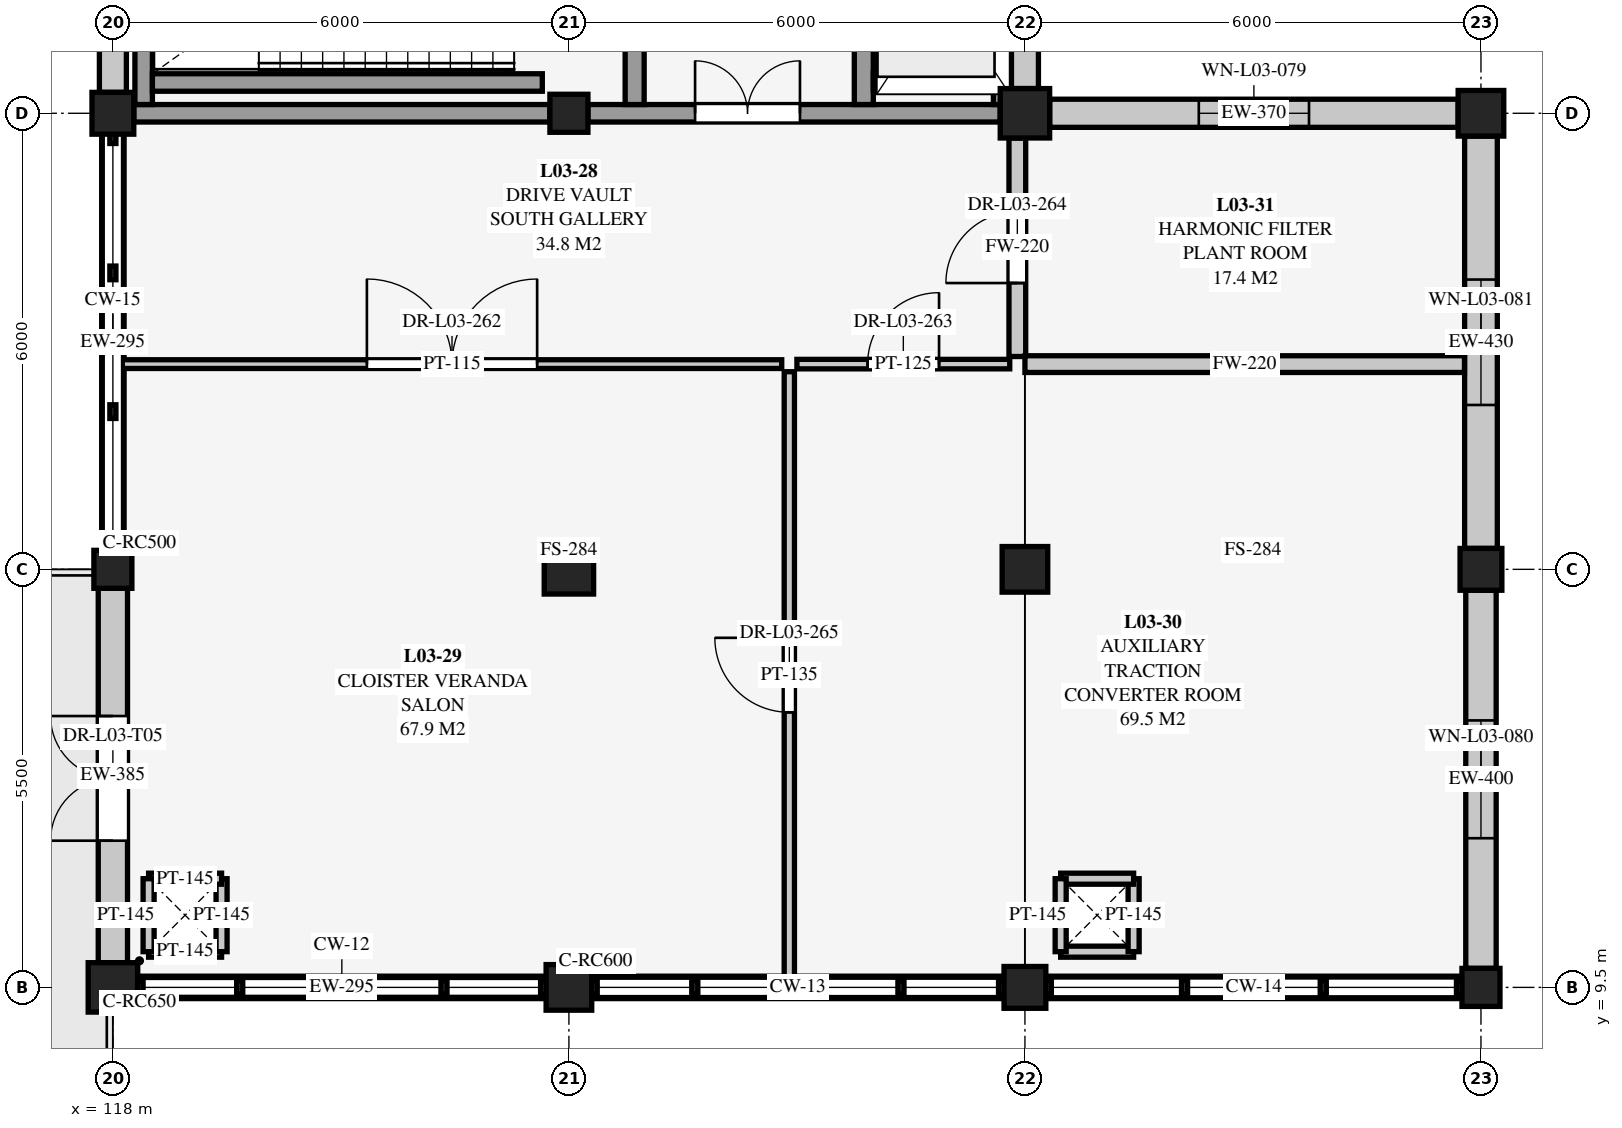
"""IFC4 building model, lengths in metres.
Left out: names, types, materials, properties, quantities, classifications, styles, units other than length and angle.
Written with IfcOpenShell. Run it as: python <this file> out.ifc"""

import sys

from ifc_helpers import new_model, si_unit, direction, frame, frame_2d, origin, origin_2d, place, context, subcontext, project, spatial, rectangle, extrude, element, fill, save


model = new_model("IFC4")
c1 = context("Model", 3, precision=1e-05, world=origin(), true_north=direction((0.0, 1.0)))
c2 = subcontext(c1, "Body", "Model", "MODEL_VIEW")
j1 = project(units=[si_unit("LENGTHUNIT", "METRE"), si_unit("PLANEANGLEUNIT", "RADIAN")], contexts=[c1])
p1 = place(None, origin())
s1 = spatial("IfcSite", under=j1, at=p1, CompositionType="ELEMENT")
p2 = place(p1, origin())
s2 = spatial("IfcBuilding", under=s1, at=p2, CompositionType="ELEMENT")
p3 = place(p2, frame((0.0, 0.0, 9.0)))
s3 = spatial("IfcBuildingStorey", under=s2, at=p3, CompositionType="ELEMENT", Elevation=9.0)
p4 = place(p3, frame((118.0, 9.5, 0.0), z_axis=(0.0, 0.0, 1.0), x_axis=(1.0, 0.0, 0.0)))
e1 = element("IfcColumn", 1, at=p4, inside=s3, PredefinedType="COLUMN", context=c2, shape_type="SweptSolid", body=[
    extrude(rectangle(XDim=0.65, YDim=0.65, at=origin_2d()), origin(), (0.0, 0.0, 1.0), 4.5),
])
p5 = place(p3, frame((118.0, 15.0, 0.0), z_axis=(0.0, 0.0, 1.0), x_axis=(1.0, 0.0, 0.0)))
e2 = element("IfcColumn", 2, at=p5, inside=s3, PredefinedType="COLUMN", context=c2, shape_type="SweptSolid", body=[
    extrude(rectangle(XDim=0.5, YDim=0.5, at=origin_2d()), origin(), (0.0, 0.0, 1.0), 4.5),
])
p6 = place(p3, frame((118.0, 21.0, 0.0), z_axis=(0.0, 0.0, 1.0), x_axis=(1.0, 0.0, 0.0)))
e3 = element("IfcColumn", 3, at=p6, inside=s3, PredefinedType="COLUMN", context=c2, shape_type="SweptSolid", body=[
    extrude(rectangle(XDim=0.55, YDim=0.55, at=origin_2d()), origin(), (0.0, 0.0, 1.0), 4.5),
])
p7 = place(p3, frame((124.0, 9.5, 0.0), z_axis=(0.0, 0.0, 1.0), x_axis=(1.0, 0.0, 0.0)))
e4 = element("IfcColumn", 4, at=p7, inside=s3, PredefinedType="COLUMN", context=c2, shape_type="SweptSolid", body=[
    extrude(rectangle(XDim=0.6, YDim=0.6, at=origin_2d()), origin(), (0.0, 0.0, 1.0), 4.5),
])
p8 = place(p3, frame((124.0, 15.0, 0.0), z_axis=(0.0, 0.0, 1.0), x_axis=(1.0, 0.0, 0.0)))
e5 = element("IfcColumn", 5, at=p8, inside=s3, PredefinedType="COLUMN", context=c2, shape_type="SweptSolid", body=[
    extrude(rectangle(XDim=0.65, YDim=0.65, at=origin_2d()), origin(), (0.0, 0.0, 1.0), 4.5),
])
p9 = place(p3, frame((124.0, 21.0, 0.0), z_axis=(0.0, 0.0, 1.0), x_axis=(1.0, 0.0, 0.0)))
e6 = element("IfcColumn", 6, at=p9, inside=s3, PredefinedType="COLUMN", context=c2, shape_type="SweptSolid", body=[
    extrude(rectangle(XDim=0.5, YDim=0.5, at=origin_2d()), origin(), (0.0, 0.0, 1.0), 4.5),
])
p10 = place(p3, frame((130.0, 9.5, 0.0), z_axis=(0.0, 0.0, 1.0), x_axis=(1.0, 0.0, 0.0)))
e7 = element("IfcColumn", 7, at=p10, inside=s3, PredefinedType="COLUMN", context=c2, shape_type="SweptSolid", body=[
    extrude(rectangle(XDim=0.55, YDim=0.55, at=origin_2d()), origin(), (0.0, 0.0, 1.0), 4.5),
])
p11 = place(p3, frame((130.0, 15.0, 0.0), z_axis=(0.0, 0.0, 1.0), x_axis=(1.0, 0.0, 0.0)))
e8 = element("IfcColumn", 8, at=p11, inside=s3, PredefinedType="COLUMN", context=c2, shape_type="SweptSolid", body=[
    extrude(rectangle(XDim=0.6, YDim=0.6, at=origin_2d()), origin(), (0.0, 0.0, 1.0), 4.5),
])
p12 = place(p3, frame((130.0, 21.0, 0.0), z_axis=(0.0, 0.0, 1.0), x_axis=(1.0, 0.0, 0.0)))
e9 = element("IfcColumn", 9, at=p12, inside=s3, PredefinedType="COLUMN", context=c2, shape_type="SweptSolid", body=[
    extrude(rectangle(XDim=0.65, YDim=0.65, at=origin_2d()), origin(), (0.0, 0.0, 1.0), 4.5),
])
p13 = place(p3, frame((136.0, 9.5, 0.0), z_axis=(0.0, 0.0, 1.0), x_axis=(1.0, 0.0, 0.0)))
e10 = element("IfcColumn", 10, at=p13, inside=s3, PredefinedType="COLUMN", context=c2, shape_type="SweptSolid", body=[
    extrude(rectangle(XDim=0.5, YDim=0.5, at=origin_2d()), origin(), (0.0, 0.0, 1.0), 4.5),
])
p14 = place(p3, frame((136.0, 15.0, 0.0), z_axis=(0.0, 0.0, 1.0), x_axis=(1.0, 0.0, 0.0)))
e11 = element("IfcColumn", 11, at=p14, inside=s3, PredefinedType="COLUMN", context=c2, shape_type="SweptSolid", body=[
    extrude(rectangle(XDim=0.55, YDim=0.55, at=origin_2d()), origin(), (0.0, 0.0, 1.0), 4.5),
])
p15 = place(p3, frame((136.0, 21.0, 0.0), z_axis=(0.0, 0.0, 1.0), x_axis=(1.0, 0.0, 0.0)))
e12 = element("IfcColumn", 12, at=p15, inside=s3, PredefinedType="COLUMN", context=c2, shape_type="SweptSolid", body=[
    extrude(rectangle(XDim=0.6, YDim=0.6, at=origin_2d()), origin(), (0.0, 0.0, 1.0), 4.5),
])
p16 = place(p3, frame((123.7, 9.5, 0.0), z_axis=(0.0, 0.0, 1.0), x_axis=(-1.0, 0.0, 0.0)))
e13 = element("IfcWall", 13, at=p16, inside=s3, PredefinedType="SOLIDWALL", context=c2, shape_type="SweptSolid", body=[
    extrude(rectangle(XDim=5.375, YDim=0.295, at=frame_2d((2.688, 0.0))), origin(), (0.0, 0.0, 1.0), 0.31),
])
p17 = place(p3, frame((129.725, 9.5, 0.0), z_axis=(0.0, 0.0, 1.0), x_axis=(-1.0, 0.0, 0.0)))
e14 = element("IfcWall", 14, at=p17, inside=s3, PredefinedType="SOLIDWALL", context=c2, shape_type="SweptSolid", body=[
    extrude(rectangle(XDim=5.425, YDim=0.295, at=frame_2d((2.712, 0.0))), origin(), (0.0, 0.0, 1.0), 0.36),
])
p18 = place(p3, frame((135.75, 9.5, 0.0), z_axis=(0.0, 0.0, 1.0), x_axis=(-1.0, 0.0, 0.0)))
e15 = element("IfcWall", 15, at=p18, inside=s3, PredefinedType="SOLIDWALL", context=c2, shape_type="SweptSolid", body=[
    extrude(rectangle(XDim=5.475, YDim=0.295, at=frame_2d((2.738, 0.0))), origin(), (0.0, 0.0, 1.0), 0.41),
])
p19 = place(p3, frame((130.325, 21.0, 0.0), z_axis=(0.0, 0.0, 1.0), x_axis=(1.0, 0.0, 0.0)))
e16 = element("IfcWall", 16, at=p19, inside=s3, PredefinedType="SOLIDWALL", context=c2, shape_type="SweptSolid", body=[
    extrude(rectangle(XDim=5.375, YDim=0.37, at=frame_2d((2.688, 0.0))), origin(), (0.0, 0.0, 1.0), 3.778),
])
p20 = place(p19, frame((1.962, 0.0, 0.75)))
e17 = element("IfcOpeningElement", 17, at=p20, cuts=e16, PredefinedType="OPENING", context=c2, shape_type="SweptSolid", body=[
    extrude(rectangle(XDim=1.45, YDim=2.25, at=frame_2d((0.725, 1.125))), frame((0.0, 0.195, 0.0), z_axis=(0.0, -1.0, 0.0), x_axis=(1.0, 0.0, 0.0)), (0.0, 0.0, 1.0), 0.39),
])
p21 = place(p3, frame((118.0, 9.825, 0.0), z_axis=(0.0, 0.0, 1.0), x_axis=(0.0, 1.0, 0.0)))
e18 = element("IfcWall", 18, at=p21, inside=s3, PredefinedType="SOLIDWALL", context=c2, shape_type="SweptSolid", body=[
    extrude(rectangle(XDim=4.925, YDim=0.385, at=frame_2d((2.462, 0.0))), origin(), (0.0, 0.0, 1.0), 4.146),
])
p22 = place(p21, frame((1.605, 0.0, 0.0)))
e19 = element("IfcOpeningElement", 19, at=p22, cuts=e18, PredefinedType="OPENING", context=c2, shape_type="SweptSolid", body=[
    extrude(rectangle(XDim=1.64, YDim=2.22, at=frame_2d((0.82, 1.11))), frame((0.0, 0.202, 0.0), z_axis=(0.0, -1.0, 0.0), x_axis=(1.0, 0.0, 0.0)), (0.0, 0.0, 1.0), 0.405),
])
p23 = place(p3, frame((136.0, 14.725, 0.0), z_axis=(0.0, 0.0, 1.0), x_axis=(0.0, -1.0, 0.0)))
e20 = element("IfcWall", 20, at=p23, inside=s3, PredefinedType="SOLIDWALL", context=c2, shape_type="SweptSolid", body=[
    extrude(rectangle(XDim=4.975, YDim=0.4, at=frame_2d((2.488, 0.0))), origin(), (0.0, 0.0, 1.0), 4.093),
])
p24 = place(p23, frame((1.712, 0.0, 0.75)))
e21 = element("IfcOpeningElement", 21, at=p24, cuts=e20, PredefinedType="OPENING", context=c2, shape_type="SweptSolid", body=[
    extrude(rectangle(XDim=1.55, YDim=2.25, at=frame_2d((0.775, 1.125))), frame((0.0, 0.21, 0.0), z_axis=(0.0, -1.0, 0.0), x_axis=(1.0, 0.0, 0.0)), (0.0, 0.0, 1.0), 0.42),
])
p25 = place(p3, frame((118.0, 15.25, 0.0), z_axis=(0.0, 0.0, 1.0), x_axis=(0.0, 1.0, 0.0)))
e22 = element("IfcWall", 22, at=p25, inside=s3, PredefinedType="SOLIDWALL", context=c2, shape_type="SweptSolid", body=[
    extrude(rectangle(XDim=5.475, YDim=0.295, at=frame_2d((2.738, 0.0))), origin(), (0.0, 0.0, 1.0), 0.46),
])
p26 = place(p3, frame((136.0, 20.7, 0.0), z_axis=(0.0, 0.0, 1.0), x_axis=(0.0, -1.0, 0.0)))
e23 = element("IfcWall", 23, at=p26, inside=s3, PredefinedType="SOLIDWALL", context=c2, shape_type="SweptSolid", body=[
    extrude(rectangle(XDim=5.425, YDim=0.43, at=frame_2d((2.712, 0.0))), origin(), (0.0, 0.0, 1.0), 4.093),
])
p27 = place(p26, frame((1.887, 0.0, 0.75)))
e24 = element("IfcOpeningElement", 24, at=p27, cuts=e23, PredefinedType="OPENING", context=c2, shape_type="SweptSolid", body=[
    extrude(rectangle(XDim=1.65, YDim=2.3, at=frame_2d((0.825, 1.15))), frame((0.0, 0.225, 0.0), z_axis=(0.0, -1.0, 0.0), x_axis=(1.0, 0.0, 0.0)), (0.0, 0.0, 1.0), 0.45),
])
p28 = place(p3, frame((118.0, 21.275, 0.0), z_axis=(0.0, 0.0, 1.0), x_axis=(0.0, 1.0, 0.0)))
e25 = element("IfcWall", 25, at=p28, inside=s3, PredefinedType="SOLIDWALL", context=c2, shape_type="SweptSolid", body=[
    extrude(rectangle(XDim=5.45, YDim=0.355, at=frame_2d((2.725, 0.0))), origin(), (0.0, 0.0, 1.0), 3.778),
])
p29 = place(p3, frame((130.0, 26.675, 0.0), z_axis=(0.0, 0.0, 1.0), x_axis=(0.0, -1.0, 0.0)))
e26 = element("IfcWall", 26, at=p29, inside=s3, PredefinedType="SOLIDWALL", context=c2, shape_type="SweptSolid", body=[
    extrude(rectangle(XDim=5.35, YDim=0.355, at=frame_2d((2.675, 0.0))), origin(), (0.0, 0.0, 1.0), 3.778),
])
for number, where, z_axis, x_axis in (
    (27, (118.47, 9.97, 0.0), (0.0, 0.0, 1.0), (1.0, 0.0, 0.0)),
    (28, (119.43, 9.97, 0.0), (0.0, 0.0, 1.0), (0.0, 1.0, 0.0)),
    (29, (119.43, 10.93, 0.0), (0.0, 0.0, 1.0), (-1.0, 0.0, 0.0)),
    (30, (118.47, 10.93, 0.0), (0.0, 0.0, 1.0), (0.0, -1.0, 0.0)),
    (31, (130.47, 9.97, 0.0), (0.0, 0.0, 1.0), (1.0, 0.0, 0.0)),
    (32, (131.43, 9.97, 0.0), (0.0, 0.0, 1.0), (0.0, 1.0, 0.0)),
    (33, (131.43, 10.93, 0.0), (0.0, 0.0, 1.0), (-1.0, 0.0, 0.0)),
    (34, (130.47, 10.93, 0.0), (0.0, 0.0, 1.0), (0.0, -1.0, 0.0)),
):
    element("IfcWall", number, at=place(p3, frame(where, z_axis=z_axis, x_axis=x_axis)), inside=s3, PredefinedType="PARTITIONING", context=c2, shape_type="SweptSolid", body=[
        extrude(rectangle(XDim=0.96, YDim=0.145, at=frame_2d((0.48, 0.0))), origin(), (0.0, 0.0, 1.0), 4.24),
    ])
p30 = place(p3, frame((118.275, 21.0, 0.0), z_axis=(0.0, 0.0, 1.0), x_axis=(1.0, 0.0, 0.0)))
e35 = element("IfcWall", 35, at=p30, inside=s3, PredefinedType="SHEAR", context=c2, shape_type="SweptSolid", body=[
    extrude(rectangle(XDim=5.475, YDim=0.23, at=frame_2d((2.738, 0.0))), origin(), (0.0, 0.0, 1.0), 4.185),
])
p31 = place(p3, frame((124.25, 21.0, 0.0), z_axis=(0.0, 0.0, 1.0), x_axis=(1.0, 0.0, 0.0)))
e36 = element("IfcWall", 36, at=p31, inside=s3, PredefinedType="SHEAR", context=c2, shape_type="SweptSolid", body=[
    extrude(rectangle(XDim=5.425, YDim=0.23, at=frame_2d((2.712, 0.0))), origin(), (0.0, 0.0, 1.0), 4.185),
])
p32 = place(p31, frame((1.41, 0.0, 0.0)))
e37 = element("IfcOpeningElement", 37, at=p32, cuts=e36, PredefinedType="OPENING", context=c2, shape_type="SweptSolid", body=[
    extrude(rectangle(XDim=1.38, YDim=2.16, at=frame_2d((0.69, 1.08))), frame((0.0, 0.125, 0.0), z_axis=(0.0, -1.0, 0.0), x_axis=(1.0, 0.0, 0.0)), (0.0, 0.0, 1.0), 0.25),
])
p33 = place(p3, frame((118.405, 21.115, 0.0), z_axis=(0.0, 0.0, 1.0), x_axis=(0.0, 1.0, 0.0)))
e38 = element("IfcWall", 38, at=p33, inside=s3, PredefinedType="SHEAR", context=c2, shape_type="SweptSolid", body=[
    extrude(rectangle(XDim=3.735, YDim=0.23, at=frame_2d((1.868, 0.0))), origin(), (0.0, 0.0, 1.0), 4.5),
])
p34 = place(p3, frame((118.52, 21.405, 0.0), z_axis=(0.0, 0.0, 1.0), x_axis=(1.0, 0.0, 0.0)))
e39 = element("IfcWall", 39, at=p34, inside=s3, PredefinedType="SHEAR", context=c2, shape_type="SweptSolid", body=[
    extrude(rectangle(XDim=5.13, YDim=0.23, at=frame_2d((2.565, 0.0))), origin(), (0.0, 0.0, 1.0), 4.5),
])
p35 = place(p3, frame((124.865, 21.115, 0.0), z_axis=(0.0, 0.0, 1.0), x_axis=(0.0, 1.0, 0.0)))
e40 = element("IfcWall", 40, at=p35, inside=s3, PredefinedType="SHEAR", context=c2, shape_type="SweptSolid", body=[
    extrude(rectangle(XDim=5.77, YDim=0.25, at=frame_2d((2.885, 0.0))), origin(), (0.0, 0.0, 1.0), 4.185),
])
p36 = place(p35, frame((4.285, 0.0, 0.0)))
e41 = element("IfcOpeningElement", 41, at=p36, cuts=e40, PredefinedType="OPENING", context=c2, shape_type="SweptSolid", body=[
    extrude(rectangle(XDim=1.04, YDim=2.14, at=frame_2d((0.52, 1.07))), frame((0.0, 0.135, 0.0), z_axis=(0.0, -1.0, 0.0), x_axis=(1.0, 0.0, 0.0)), (0.0, 0.0, 1.0), 0.27),
])
p37 = place(p3, frame((127.88, 21.115, 0.0), z_axis=(0.0, 0.0, 1.0), x_axis=(0.0, 1.0, 0.0)))
e42 = element("IfcWall", 42, at=p37, inside=s3, PredefinedType="SHEAR", context=c2, shape_type="SweptSolid", body=[
    extrude(rectangle(XDim=2.965, YDim=0.25, at=frame_2d((1.482, 0.0))), origin(), (0.0, 0.0, 1.0), 4.5),
])
p38 = place(p37, frame((1.095, 0.0, 0.0)))
e43 = element("IfcOpeningElement", 43, at=p38, cuts=e42, PredefinedType="OPENING", context=c2, shape_type="SweptSolid", body=[
    extrude(rectangle(XDim=1.08, YDim=2.15, at=frame_2d((0.54, 1.075))), frame((0.0, 0.135, 0.0), z_axis=(0.0, -1.0, 0.0), x_axis=(1.0, 0.0, 0.0)), (0.0, 0.0, 1.0), 0.27),
])
p39 = place(p3, frame((128.005, 21.42, 0.0), z_axis=(0.0, 0.0, 1.0), x_axis=(1.0, 0.0, 0.0)))
e44 = element("IfcWall", 44, at=p39, inside=s3, PredefinedType="SHEAR", context=c2, shape_type="SweptSolid", body=[
    extrude(rectangle(XDim=1.58, YDim=0.23, at=frame_2d((0.79, 0.0))), origin(), (0.0, 0.0, 1.0), 4.5),
])
p40 = place(p3, frame((129.7, 21.115, 0.0), z_axis=(0.0, 0.0, 1.0), x_axis=(0.0, 1.0, 0.0)))
e45 = element("IfcWall", 45, at=p40, inside=s3, PredefinedType="SHEAR", context=c2, shape_type="SweptSolid", body=[
    extrude(rectangle(XDim=2.965, YDim=0.23, at=frame_2d((1.482, 0.0))), origin(), (0.0, 0.0, 1.0), 4.5),
])
p41 = place(p3, frame((118.124, 17.7, 0.0), z_axis=(0.0, 0.0, 1.0), x_axis=(1.0, 0.0, 0.0)))
e46 = element("IfcWall", 46, at=p41, inside=s3, PredefinedType="PARTITIONING", context=c2, shape_type="SweptSolid", body=[
    extrude(rectangle(XDim=8.676, YDim=0.115, at=frame_2d((4.338, 0.0))), origin(), (0.0, 0.0, 1.0), 4.24),
])
p42 = place(p41, frame((3.218, 0.0, 0.0)))
e47 = element("IfcOpeningElement", 47, at=p42, cuts=e46, PredefinedType="OPENING", context=c2, shape_type="SweptSolid", body=[
    extrude(rectangle(XDim=2.24, YDim=2.4, at=frame_2d((1.12, 1.2))), frame((0.0, 0.068, 0.0), z_axis=(0.0, -1.0, 0.0), x_axis=(1.0, 0.0, 0.0)), (0.0, 0.0, 1.0), 0.135),
])
p43 = place(p3, frame((127.0, 17.7, 0.0), z_axis=(0.0, 0.0, 1.0), x_axis=(1.0, 0.0, 0.0)))
e48 = element("IfcWall", 48, at=p43, inside=s3, PredefinedType="PARTITIONING", context=c2, shape_type="SweptSolid", body=[
    extrude(rectangle(XDim=2.8, YDim=0.125, at=frame_2d((1.4, 0.0))), origin(), (0.0, 0.0, 1.0), 4.24),
])
p44 = place(p43, frame((0.93, 0.0, 0.0)))
e49 = element("IfcOpeningElement", 49, at=p44, cuts=e48, PredefinedType="OPENING", context=c2, shape_type="SweptSolid", body=[
    extrude(rectangle(XDim=0.94, YDim=2.12, at=frame_2d((0.47, 1.06))), frame((0.0, 0.073, 0.0), z_axis=(0.0, -1.0, 0.0), x_axis=(1.0, 0.0, 0.0)), (0.0, 0.0, 1.0), 0.145),
])
p45 = place(p3, frame((129.9, 17.8, 0.0), z_axis=(0.0, 0.0, 1.0), x_axis=(0.0, 1.0, 0.0)))
e50 = element("IfcWall", 50, at=p45, inside=s3, PredefinedType="SOLIDWALL", context=c2, shape_type="SweptSolid", body=[
    extrude(rectangle(XDim=2.873, YDim=0.22, at=frame_2d((1.437, 0.0))), origin(), (0.0, 0.0, 1.0), 4.24),
])
p46 = place(p45, frame((0.967, 0.0, 0.0)))
e51 = element("IfcOpeningElement", 51, at=p46, cuts=e50, PredefinedType="OPENING", context=c2, shape_type="SweptSolid", body=[
    extrude(rectangle(XDim=0.94, YDim=2.1, at=frame_2d((0.47, 1.05))), frame((0.0, 0.12, 0.0), z_axis=(0.0, -1.0, 0.0), x_axis=(1.0, 0.0, 0.0)), (0.0, 0.0, 1.0), 0.24),
])
p47 = place(p3, frame((126.9, 9.618, 0.0), z_axis=(0.0, 0.0, 1.0), x_axis=(0.0, 1.0, 0.0)))
e52 = element("IfcWall", 52, at=p47, inside=s3, PredefinedType="PARTITIONING", context=c2, shape_type="SweptSolid", body=[
    extrude(rectangle(XDim=7.982, YDim=0.135, at=frame_2d((3.991, 0.0))), origin(), (0.0, 0.0, 1.0), 4.24),
])
p48 = place(p47, frame((3.501, 0.0, 0.0)))
e53 = element("IfcOpeningElement", 53, at=p48, cuts=e52, PredefinedType="OPENING", context=c2, shape_type="SweptSolid", body=[
    extrude(rectangle(XDim=0.98, YDim=2.14, at=frame_2d((0.49, 1.07))), frame((0.0, 0.077, 0.0), z_axis=(0.0, -1.0, 0.0), x_axis=(1.0, 0.0, 0.0)), (0.0, 0.0, 1.0), 0.155),
])
p49 = place(p3, frame((130.0, 17.7, 0.0), z_axis=(0.0, 0.0, 1.0), x_axis=(1.0, 0.0, 0.0)))
e54 = element("IfcWall", 54, at=p49, inside=s3, PredefinedType="SOLIDWALL", context=c2, shape_type="SweptSolid", body=[
    extrude(rectangle(XDim=5.783, YDim=0.22, at=frame_2d((2.892, 0.0))), origin(), (0.0, 0.0, 1.0), 4.24),
])
p50 = place(p20, origin())
e55 = element("IfcWindow", 55, at=p50, inside=s3, PartitioningType="SINGLE_PANEL", PredefinedType="WINDOW", context=c2, shape_type="SweptSolid", body=[
    extrude(rectangle(XDim=1.45, YDim=2.25, at=frame_2d((0.725, 1.125))), frame((0.0, 0.03, 0.0), z_axis=(0.0, -1.0, 0.0), x_axis=(1.0, 0.0, 0.0)), (0.0, 0.0, 1.0), 0.06),
])
fill(e17, e55)
p51 = place(p22, origin())
e56 = element("IfcDoor", 56, at=p51, inside=s3, OperationType="DOUBLE_DOOR_SINGLE_SWING", PredefinedType="DOOR", context=c2, shape_type="SweptSolid", body=[
    extrude(rectangle(XDim=1.64, YDim=2.22, at=frame_2d((0.82, 1.11))), frame((0.0, 0.025, 0.0), z_axis=(0.0, -1.0, 0.0), x_axis=(1.0, 0.0, 0.0)), (0.0, 0.0, 1.0), 0.05),
])
fill(e19, e56)
p52 = place(p24, origin())
e57 = element("IfcWindow", 57, at=p52, inside=s3, PartitioningType="SINGLE_PANEL", PredefinedType="WINDOW", context=c2, shape_type="SweptSolid", body=[
    extrude(rectangle(XDim=1.55, YDim=2.25, at=frame_2d((0.775, 1.125))), frame((0.0, 0.03, 0.0), z_axis=(0.0, -1.0, 0.0), x_axis=(1.0, 0.0, 0.0)), (0.0, 0.0, 1.0), 0.06),
])
fill(e21, e57)
p53 = place(p27, origin())
e58 = element("IfcWindow", 58, at=p53, inside=s3, PartitioningType="SINGLE_PANEL", PredefinedType="WINDOW", context=c2, shape_type="SweptSolid", body=[
    extrude(rectangle(XDim=1.65, YDim=2.3, at=frame_2d((0.825, 1.15))), frame((0.0, 0.03, 0.0), z_axis=(0.0, -1.0, 0.0), x_axis=(1.0, 0.0, 0.0)), (0.0, 0.0, 1.0), 0.06),
])
fill(e24, e58)
p54 = place(p32, origin())
e59 = element("IfcDoor", 59, at=p54, inside=s3, OperationType="DOUBLE_DOOR_SINGLE_SWING", PredefinedType="DOOR", context=c2, shape_type="SweptSolid", body=[
    extrude(rectangle(XDim=1.38, YDim=2.16, at=frame_2d((0.69, 1.08))), frame((0.0, 0.025, 0.0), z_axis=(0.0, -1.0, 0.0), x_axis=(1.0, 0.0, 0.0)), (0.0, 0.0, 1.0), 0.05),
])
fill(e37, e59)
p55 = place(p42, origin())
e60 = element("IfcDoor", 60, at=p55, inside=s3, OperationType="DOUBLE_DOOR_SINGLE_SWING", PredefinedType="DOOR", context=c2, shape_type="SweptSolid", body=[
    extrude(rectangle(XDim=2.24, YDim=2.4, at=frame_2d((1.12, 1.2))), frame((0.0, 0.025, 0.0), z_axis=(0.0, -1.0, 0.0), x_axis=(1.0, 0.0, 0.0)), (0.0, 0.0, 1.0), 0.05),
])
fill(e47, e60)
p56 = place(p44, origin())
e61 = element("IfcDoor", 61, at=p56, inside=s3, OperationType="SINGLE_SWING_RIGHT", PredefinedType="DOOR", context=c2, shape_type="SweptSolid", body=[
    extrude(rectangle(XDim=0.94, YDim=2.12, at=frame_2d((0.47, 1.06))), frame((0.0, 0.025, 0.0), z_axis=(0.0, -1.0, 0.0), x_axis=(1.0, 0.0, 0.0)), (0.0, 0.0, 1.0), 0.05),
])
fill(e49, e61)
p57 = place(p46, origin())
e62 = element("IfcDoor", 62, at=p57, inside=s3, OperationType="SINGLE_SWING_LEFT", PredefinedType="DOOR", context=c2, shape_type="SweptSolid", body=[
    extrude(rectangle(XDim=0.94, YDim=2.1, at=frame_2d((0.47, 1.05))), frame((0.0, 0.025, 0.0), z_axis=(0.0, -1.0, 0.0), x_axis=(1.0, 0.0, 0.0)), (0.0, 0.0, 1.0), 0.05),
])
fill(e51, e62)
p58 = place(p48, origin())
e63 = element("IfcDoor", 63, at=p58, inside=s3, OperationType="SINGLE_SWING_RIGHT", PredefinedType="DOOR", context=c2, shape_type="SweptSolid", body=[
    extrude(rectangle(XDim=0.98, YDim=2.14, at=frame_2d((0.49, 1.07))), frame((0.0, 0.025, 0.0), z_axis=(0.0, -1.0, 0.0), x_axis=(1.0, 0.0, 0.0)), (0.0, 0.0, 1.0), 0.05),
])
fill(e53, e63)
save(model, sys.argv[1])
